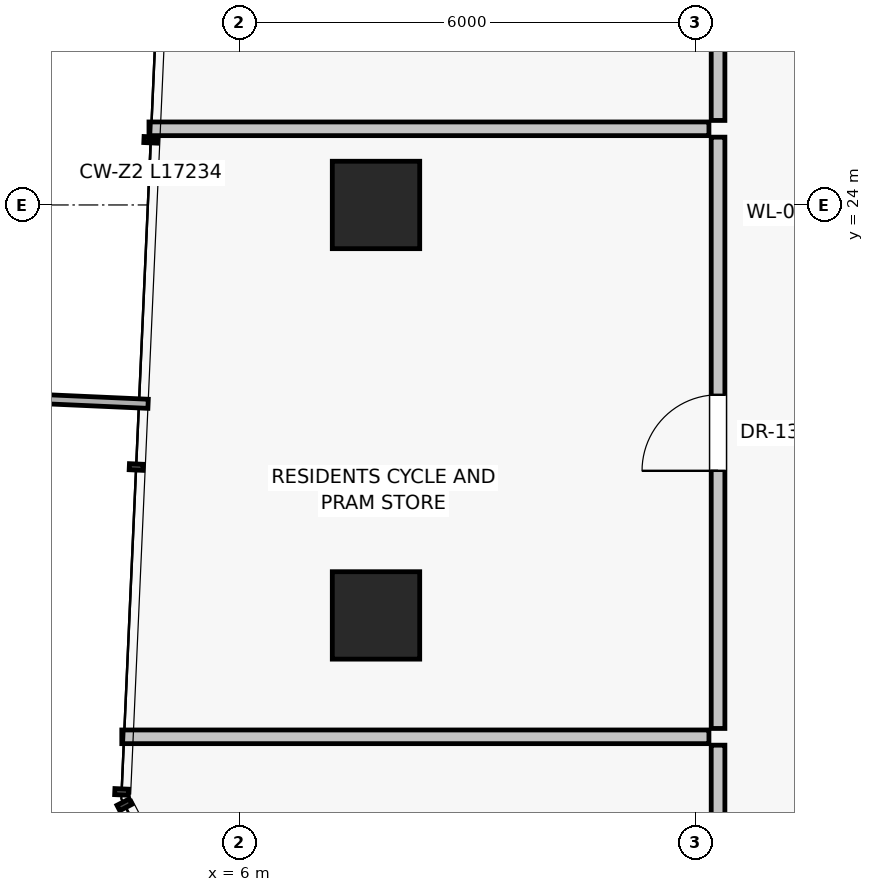
"""IFC4 building model, lengths in metres.
Left out: names, types, materials, properties, quantities, classifications, styles, units other than length and angle.
Written with IfcOpenShell. Run it as: python <this file> out.ifc"""

import sys

from ifc_helpers import new_model, si_unit, direction, frame, frame_2d, origin, origin_2d, place, context, subcontext, project, spatial, rectangle, extrude, source, transform, mapped, element, fill, save


model = new_model("IFC4")
c1 = context("Model", 3, precision=1e-05, world=origin(), true_north=direction((0.0, 1.0)))
c2 = subcontext(c1, "Body", "Model", "MODEL_VIEW")
j1 = project(units=[si_unit("LENGTHUNIT", "METRE"), si_unit("PLANEANGLEUNIT", "RADIAN")], contexts=[c1])
p1 = place(None, origin())
s1 = spatial("IfcSite", under=j1, at=p1, CompositionType="ELEMENT")
p2 = place(p1, origin())
s2 = spatial("IfcBuilding", under=s1, at=p2, CompositionType="ELEMENT")
p3 = place(p2, frame((0.0, 0.0, 119.75)))
s3 = spatial("IfcBuildingStorey", under=s2, at=p3, CompositionType="ELEMENT", Elevation=119.75)
for number, where, z_axis, x_axis in (
    (1, (7.8, 24.0, 0.0), (0.0, 0.0, 1.0), (1.0, 0.0, 0.0)),
    (2, (7.8, 18.6, 0.0), (0.0, 0.0, 1.0), (1.0, 0.0, 0.0)),
):
    element("IfcColumn", number, at=place(p3, frame(where, z_axis=z_axis, x_axis=x_axis)), inside=s3, PredefinedType="COLUMN", context=c2, shape_type="SweptSolid", body=[
        extrude(rectangle(XDim=1.15, YDim=1.15, at=origin_2d()), origin(), (0.0, 0.0, 1.0), 3.25),
    ])
p4 = place(p3, frame((12.3, 12.21, 0.0), z_axis=(0.0, 0.0, 1.0), x_axis=(0.0, 1.0, 0.0)))
e3 = element("IfcWall", 3, at=p4, inside=s3, PredefinedType="PARTITIONING", context=c2, shape_type="SweptSolid", body=[
    extrude(rectangle(XDim=4.683, YDim=0.18, at=frame_2d((2.342, 0.0))), origin(), (0.0, 0.0, 1.0), 3.0),
])
p5 = place(p4, frame((1.842, 0.0, 0.0)))
e4 = element("IfcOpeningElement", 4, at=p5, cuts=e3, PredefinedType="OPENING", context=c2, shape_type="SweptSolid", body=[
    extrude(rectangle(XDim=1.0, YDim=2.01, at=frame_2d((0.5, 1.005))), frame((0.0, 0.1, 0.0), z_axis=(0.0, -1.0, 0.0), x_axis=(1.0, 0.0, 0.0)), (0.0, 0.0, 1.0), 0.2),
])
p6 = place(p3, frame((12.3, 17.113, 0.0), z_axis=(0.0, 0.0, 1.0), x_axis=(0.0, 1.0, 0.0)))
e5 = element("IfcWall", 5, at=p6, inside=s3, PredefinedType="PARTITIONING", context=c2, shape_type="SweptSolid", body=[
    extrude(rectangle(XDim=7.779, YDim=0.18, at=frame_2d((3.89, 0.0))), origin(), (0.0, 0.0, 1.0), 2.58),
])
p7 = place(p6, frame((3.389, 0.0, 0.0)))
e6 = element("IfcOpeningElement", 6, at=p7, cuts=e5, PredefinedType="OPENING", context=c2, shape_type="SweptSolid", body=[
    extrude(rectangle(XDim=1.0, YDim=2.01, at=frame_2d((0.5, 1.005))), frame((0.0, 0.1, 0.0), z_axis=(0.0, -1.0, 0.0), x_axis=(1.0, 0.0, 0.0)), (0.0, 0.0, 1.0), 0.2),
])
p8 = place(p3, frame((12.18, 17.003, 0.0), z_axis=(0.0, 0.0, 1.0), x_axis=(-1.0, 0.0, 0.0)))
e7 = element("IfcWall", 7, at=p8, inside=s3, PredefinedType="PARTITIONING", context=c2, shape_type="SweptSolid", body=[
    extrude(rectangle(XDim=7.724, YDim=0.18, at=frame_2d((3.862, 0.0))), origin(), (0.0, 0.0, 1.0), 3.0),
])
p9 = place(p3, frame((12.18, 25.002, 0.0), z_axis=(0.0, 0.0, 1.0), x_axis=(-1.0, 0.0, 0.0)))
e8 = element("IfcWall", 8, at=p9, inside=s3, PredefinedType="PARTITIONING", context=c2, shape_type="SweptSolid", body=[
    extrude(rectangle(XDim=7.367, YDim=0.18, at=frame_2d((3.683, 0.0))), origin(), (0.0, 0.0, 1.0), 3.0),
])
p10 = place(p3, frame((12.3, 25.112, 0.0), z_axis=(0.0, 0.0, 1.0), x_axis=(0.0, 1.0, 0.0)))
e9 = element("IfcWall", 9, at=p10, inside=s3, PredefinedType="PARTITIONING", context=c2, shape_type="SweptSolid", body=[
    extrude(rectangle(XDim=3.845, YDim=0.18, at=frame_2d((1.922, 0.0))), origin(), (0.0, 0.0, 1.0), 2.58),
])
p11 = place(p10, frame((1.423, 0.0, 0.0)))
e10 = element("IfcOpeningElement", 10, at=p11, cuts=e9, PredefinedType="OPENING", context=c2, shape_type="SweptSolid", body=[
    extrude(rectangle(XDim=1.0, YDim=2.01, at=frame_2d((0.5, 1.005))), frame((0.0, 0.1, 0.0), z_axis=(0.0, -1.0, 0.0), x_axis=(1.0, 0.0, 0.0)), (0.0, 0.0, 1.0), 0.2),
])
m1 = source(origin(), c2, "Body", "SweptSolid", [
    extrude(rectangle(XDim=1.0, YDim=2.01, at=frame_2d((0.5, 1.005))), frame((0.0, 0.025, 0.0), z_axis=(0.0, -1.0, 0.0), x_axis=(1.0, 0.0, 0.0)), (0.0, 0.0, 1.0), 0.05),
])
p12 = place(p7, origin())
e11 = element("IfcDoor", 11, at=p12, inside=s3, OperationType="SINGLE_SWING_LEFT", PredefinedType="DOOR", context=c2, shape_type="MappedRepresentation", body=[
    mapped(m1, transform((0.0, 0.0, 0.0), scale=1.0)),
])
fill(e6, e11)
save(model, sys.argv[1])
